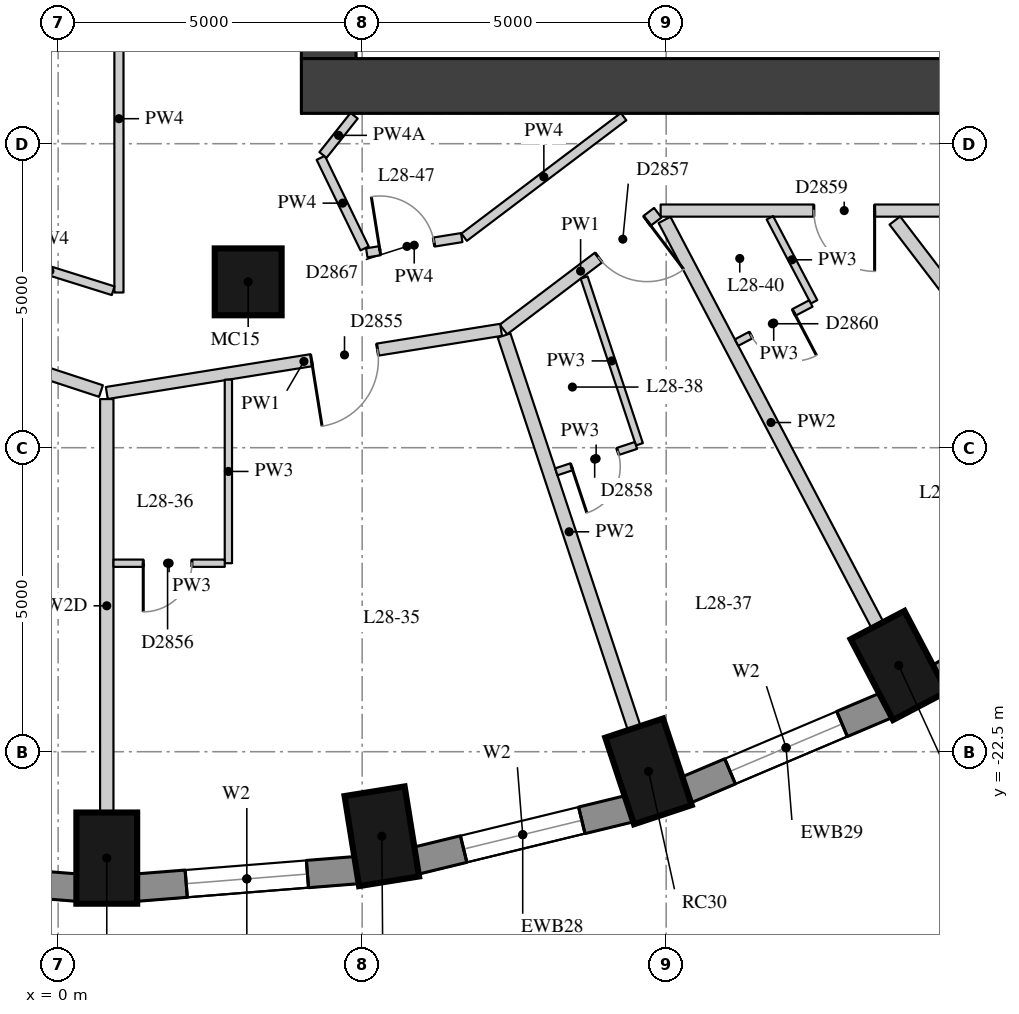
"""IFC4 building model, lengths in metres.
Left out: names, types, materials, properties, quantities, classifications, styles, units other than length and angle.
Written with IfcOpenShell. Run it as: python <this file> out.ifc"""

import sys

from ifc_helpers import new_model, si_unit, direction, frame, frame_2d, origin, origin_2d, place, context, subcontext, project, spatial, rectangle, extrude, element, fill, save


model = new_model("IFC4")
c1 = context("Model", 3, precision=1e-05, world=origin(), true_north=direction((0.0, 1.0)))
c2 = subcontext(c1, "Body", "Model", "MODEL_VIEW")
j1 = project(units=[si_unit("LENGTHUNIT", "METRE"), si_unit("PLANEANGLEUNIT", "RADIAN")], contexts=[c1])
p1 = place(None, origin())
s1 = spatial("IfcSite", under=j1, at=p1, CompositionType="ELEMENT")
p2 = place(p1, origin())
s2 = spatial("IfcBuilding", under=s1, at=p2, CompositionType="ELEMENT")
p3 = place(p2, frame((0.0, 0.0, 102.1)))
s3 = spatial("IfcBuildingStorey", under=s2, at=p3, CompositionType="ELEMENT", Elevation=102.1)
for number, where, z_axis, x_axis in (
    (1, (0.8, -24.25, 0.0), (0.0, 0.0, 1.0), (0.0, -1.0, 0.0)),
    (2, (5.323, -23.891, 0.0), (0.0, 0.0, 1.0), (0.159, -0.987, 0.0)),
    (3, (9.71, -22.824, 0.0), (0.0, 0.0, 1.0), (0.315, -0.949, 0.0)),
    (4, (13.825, -21.082, 0.0), (0.0, 0.0, 1.0), (0.465, -0.885, 0.0)),
):
    element("IfcColumn", number, at=place(p3, frame(where, z_axis=z_axis, x_axis=x_axis)), inside=s3, PredefinedType="COLUMN", context=c2, shape_type="SweptSolid", body=[
        extrude(rectangle(XDim=1.5, YDim=1.0, at=origin_2d()), origin(), (0.0, 0.0, 1.0), 3.3),
    ])
p4 = place(p3, frame((3.126, -14.772, 0.0), z_axis=(0.0, 0.0, 1.0), x_axis=(1.0, 0.0, 0.0)))
e5 = element("IfcColumn", 5, at=p4, inside=s3, PredefinedType="COLUMN", context=c2, shape_type="SweptSolid", body=[
    extrude(rectangle(XDim=1.1, YDim=1.1, at=origin_2d()), origin(), (0.0, 0.0, 1.0), 3.3),
])
p5 = place(p3, frame((-3.327, -24.447, 0.0), z_axis=(0.0, 0.0, 1.0), x_axis=(0.996862216754, -0.079156306178, 0.0)))
e6 = element("IfcWall", 6, at=p5, inside=s3, PredefinedType="SOLIDWALL", context=c2, shape_type="SweptSolid", body=[
    extrude(rectangle(XDim=3.658, YDim=0.45, at=frame_2d((1.829, 0.0))), origin(), (0.0, 0.0, 1.0), 3.02),
])
p6 = place(p5, frame((0.829, 0.0, 0.4)))
e7 = element("IfcOpeningElement", 7, at=p6, cuts=e6, PredefinedType="OPENING", context=c2, shape_type="SweptSolid", body=[
    extrude(rectangle(XDim=2.0, YDim=1.75, at=frame_2d((1.0, 0.875))), frame((0.0, 0.235, 0.0), z_axis=(0.0, -1.0, 0.0), x_axis=(1.0, 0.0, 0.0)), (0.0, 0.0, 1.0), 0.47),
])
p7 = place(p3, frame((1.28, -24.736, 0.0), z_axis=(0.0, 0.0, 1.0), x_axis=(0.996862216754, 0.079156306178, 0.0)))
e8 = element("IfcWall", 8, at=p7, inside=s3, PredefinedType="SOLIDWALL", context=c2, shape_type="SweptSolid", body=[
    extrude(rectangle(XDim=3.658, YDim=0.45, at=frame_2d((1.829, 0.0))), origin(), (0.0, 0.0, 1.0), 3.02),
])
p8 = place(p7, frame((0.829, 0.0, 0.4)))
e9 = element("IfcOpeningElement", 9, at=p8, cuts=e8, PredefinedType="OPENING", context=c2, shape_type="SweptSolid", body=[
    extrude(rectangle(XDim=2.0, YDim=1.75, at=frame_2d((1.0, 0.875))), frame((0.0, 0.235, 0.0), z_axis=(0.0, -1.0, 0.0), x_axis=(1.0, 0.0, 0.0)), (0.0, 0.0, 1.0), 0.47),
])
p9 = place(p3, frame((5.875, -24.294, 0.0), z_axis=(0.0, 0.0, 1.0), x_axis=(0.971667603162, 0.236351579148, 0.0)))
e10 = element("IfcWall", 10, at=p9, inside=s3, PredefinedType="SOLIDWALL", context=c2, shape_type="SweptSolid", body=[
    extrude(rectangle(XDim=3.635, YDim=0.45, at=frame_2d((1.817, 0.0))), origin(), (0.0, 0.0, 1.0), 3.02),
])
p10 = place(p9, frame((0.817, 0.0, 0.4)))
e11 = element("IfcOpeningElement", 11, at=p10, cuts=e10, PredefinedType="OPENING", context=c2, shape_type="SweptSolid", body=[
    extrude(rectangle(XDim=2.0, YDim=1.75, at=frame_2d((1.0, 0.875))), frame((0.0, 0.235, 0.0), z_axis=(0.0, -1.0, 0.0), x_axis=(1.0, 0.0, 0.0)), (0.0, 0.0, 1.0), 0.47),
])
p11 = place(p3, frame((10.318, -23.134, 0.0), z_axis=(0.0, 0.0, 1.0), x_axis=(0.920869643542, 0.389870619055, 0.0)))
e12 = element("IfcWall", 12, at=p11, inside=s3, PredefinedType="SOLIDWALL", context=c2, shape_type="SweptSolid", body=[
    extrude(rectangle(XDim=3.591, YDim=0.45, at=frame_2d((1.796, 0.0))), origin(), (0.0, 0.0, 1.0), 3.02),
])
p12 = place(p11, frame((0.796, 0.0, 0.4)))
e13 = element("IfcOpeningElement", 13, at=p12, cuts=e12, PredefinedType="OPENING", context=c2, shape_type="SweptSolid", body=[
    extrude(rectangle(XDim=2.0, YDim=1.75, at=frame_2d((1.0, 0.875))), frame((0.0, 0.235, 0.0), z_axis=(0.0, -1.0, 0.0), x_axis=(1.0, 0.0, 0.0)), (0.0, 0.0, 1.0), 0.47),
])
p13 = place(p3, frame((14.475, -21.287, 0.0), z_axis=(0.0, 0.0, 1.0), x_axis=(0.843911841423, 0.536481876587, 0.0)))
e14 = element("IfcWall", 14, at=p13, inside=s3, PredefinedType="SOLIDWALL", context=c2, shape_type="SweptSolid", body=[
    extrude(rectangle(XDim=3.532, YDim=0.45, at=frame_2d((1.766, 0.0))), origin(), (0.0, 0.0, 1.0), 3.02),
])
p14 = place(p13, frame((0.766, 0.0, 0.4)))
e15 = element("IfcOpeningElement", 15, at=p14, cuts=e14, PredefinedType="OPENING", context=c2, shape_type="SweptSolid", body=[
    extrude(rectangle(XDim=2.0, YDim=1.75, at=frame_2d((1.0, 0.875))), frame((0.0, 0.235, 0.0), z_axis=(0.0, -1.0, 0.0), x_axis=(1.0, 0.0, 0.0)), (0.0, 0.0, 1.0), 0.47),
])
p15 = place(p3, frame((4.45, -11.1, 0.0), z_axis=(0.0, 0.0, 1.0), x_axis=(0.0, 1.0, 0.0)))
e16 = element("IfcWall", 16, at=p15, inside=s3, PredefinedType="SHEAR", context=c2, shape_type="SweptSolid", body=[
    extrude(rectangle(XDim=22.2, YDim=0.9, at=frame_2d((11.1, 0.0))), origin(), (0.0, 0.0, 1.0), 3.02),
])
p16 = place(p15, frame((2.35, 0.0, 0.0)))
e17 = element("IfcOpeningElement", 17, at=p16, cuts=e16, PredefinedType="OPENING", context=c2, shape_type="SweptSolid", body=[
    extrude(rectangle(XDim=1.5, YDim=2.1, at=frame_2d((0.75, 1.05))), frame((0.0, 0.46, 0.0), z_axis=(0.0, -1.0, 0.0), x_axis=(1.0, 0.0, 0.0)), (0.0, 0.0, 1.0), 0.92),
])
p17 = place(p15, frame((5.45, 0.0, 0.0)))
e18 = element("IfcOpeningElement", 18, at=p17, cuts=e16, PredefinedType="OPENING", context=c2, shape_type="SweptSolid", body=[
    extrude(rectangle(XDim=1.8, YDim=2.1, at=frame_2d((0.9, 1.05))), frame((0.0, 0.46, 0.0), z_axis=(0.0, -1.0, 0.0), x_axis=(1.0, 0.0, 0.0)), (0.0, 0.0, 1.0), 0.92),
])
p18 = place(p15, frame((7.95, 0.0, 0.0)))
e19 = element("IfcOpeningElement", 19, at=p18, cuts=e16, PredefinedType="OPENING", context=c2, shape_type="SweptSolid", body=[
    extrude(rectangle(XDim=1.1, YDim=2.1, at=frame_2d((0.55, 1.05))), frame((0.0, 0.46, 0.0), z_axis=(0.0, -1.0, 0.0), x_axis=(1.0, 0.0, 0.0)), (0.0, 0.0, 1.0), 0.92),
])
p19 = place(p15, frame((10.6, 0.0, 0.0)))
e20 = element("IfcOpeningElement", 20, at=p19, cuts=e16, PredefinedType="OPENING", context=c2, shape_type="SweptSolid", body=[
    extrude(rectangle(XDim=1.0, YDim=2.1, at=frame_2d((0.5, 1.05))), frame((0.0, 0.46, 0.0), z_axis=(0.0, -1.0, 0.0), x_axis=(1.0, 0.0, 0.0)), (0.0, 0.0, 1.0), 0.92),
])
p20 = place(p15, frame((13.15, 0.0, 0.0)))
e21 = element("IfcOpeningElement", 21, at=p20, cuts=e16, PredefinedType="OPENING", context=c2, shape_type="SweptSolid", body=[
    extrude(rectangle(XDim=1.1, YDim=2.1, at=frame_2d((0.55, 1.05))), frame((0.0, 0.46, 0.0), z_axis=(0.0, -1.0, 0.0), x_axis=(1.0, 0.0, 0.0)), (0.0, 0.0, 1.0), 0.92),
])
p21 = place(p15, frame((14.95, 0.0, 0.0)))
e22 = element("IfcOpeningElement", 22, at=p21, cuts=e16, PredefinedType="OPENING", context=c2, shape_type="SweptSolid", body=[
    extrude(rectangle(XDim=1.8, YDim=2.1, at=frame_2d((0.9, 1.05))), frame((0.0, 0.46, 0.0), z_axis=(0.0, -1.0, 0.0), x_axis=(1.0, 0.0, 0.0)), (0.0, 0.0, 1.0), 0.92),
])
p22 = place(p15, frame((18.35, 0.0, 0.0)))
e23 = element("IfcOpeningElement", 23, at=p22, cuts=e16, PredefinedType="OPENING", context=c2, shape_type="SweptSolid", body=[
    extrude(rectangle(XDim=1.5, YDim=2.1, at=frame_2d((0.75, 1.05))), frame((0.0, 0.46, 0.0), z_axis=(0.0, -1.0, 0.0), x_axis=(1.0, 0.0, 0.0)), (0.0, 0.0, 1.0), 0.92),
])
p23 = place(p3, frame((4.0, -11.55, 0.0), z_axis=(0.0, 0.0, 1.0), x_axis=(1.0, 0.0, 0.0)))
e24 = element("IfcWall", 24, at=p23, inside=s3, PredefinedType="SHEAR", context=c2, shape_type="SweptSolid", body=[
    extrude(rectangle(XDim=15.2, YDim=0.9, at=frame_2d((7.6, 0.0))), origin(), (0.0, 0.0, 1.0), 3.02),
])
p24 = place(p3, frame((20.7, -13.6, 0.0), z_axis=(0.0, 0.0, 1.0), x_axis=(-1.0, 0.0, 0.0)))
e25 = element("IfcWall", 25, at=p24, inside=s3, PredefinedType="PARTITIONING", context=c2, shape_type="SweptSolid", body=[
    extrude(rectangle(XDim=10.791, YDim=0.2, at=frame_2d((5.396, 0.0))), origin(), (0.0, 0.0, 1.0), 3.02),
])
p25 = place(p24, frame((7.272, 0.0, 0.0)))
e26 = element("IfcOpeningElement", 26, at=p25, cuts=e25, PredefinedType="OPENING", context=c2, shape_type="SweptSolid", body=[
    extrude(rectangle(XDim=1.0, YDim=2.1, at=frame_2d((0.5, 1.05))), frame((0.0, 0.11, 0.0), z_axis=(0.0, -1.0, 0.0), x_axis=(1.0, 0.0, 0.0)), (0.0, 0.0, 1.0), 0.22),
])
p26 = place(p24, frame((2.638, 0.0, 0.0)))
e27 = element("IfcOpeningElement", 27, at=p26, cuts=e25, PredefinedType="OPENING", context=c2, shape_type="SweptSolid", body=[
    extrude(rectangle(XDim=1.8, YDim=2.1, at=frame_2d((0.9, 1.05))), frame((0.0, 0.11, 0.0), z_axis=(0.0, -1.0, 0.0), x_axis=(1.0, 0.0, 0.0)), (0.0, 0.0, 1.0), 0.22),
])
p27 = place(p3, frame((9.861, -13.636, 0.0), z_axis=(0.0, 0.0, 1.0), x_axis=(-0.797589990076, -0.603199973251, 0.0)))
e28 = element("IfcWall", 28, at=p27, inside=s3, PredefinedType="PARTITIONING", context=c2, shape_type="SweptSolid", body=[
    extrude(rectangle(XDim=3.181, YDim=0.2, at=frame_2d((1.591, 0.0))), origin(), (0.0, 0.0, 1.0), 3.02),
])
p28 = place(p27, frame((0.22, 0.0, 0.0)))
e29 = element("IfcOpeningElement", 29, at=p28, cuts=e28, PredefinedType="OPENING", context=c2, shape_type="SweptSolid", body=[
    extrude(rectangle(XDim=1.0, YDim=2.1, at=frame_2d((0.5, 1.05))), frame((0.0, 0.11, 0.0), z_axis=(0.0, -1.0, 0.0), x_axis=(1.0, 0.0, 0.0)), (0.0, 0.0, 1.0), 0.22),
])
p29 = place(p3, frame((7.284, -15.561, 0.0), z_axis=(0.0, 0.0, 1.0), x_axis=(-0.987409293733, -0.158186240393, 0.0)))
e30 = element("IfcWall", 30, at=p29, inside=s3, PredefinedType="PARTITIONING", context=c2, shape_type="SweptSolid", body=[
    extrude(rectangle(XDim=6.567, YDim=0.2, at=frame_2d((3.284, 0.0))), origin(), (0.0, 0.0, 1.0), 3.02),
])
p30 = place(p29, frame((2.057, 0.0, 0.0)))
e31 = element("IfcOpeningElement", 31, at=p30, cuts=e30, PredefinedType="OPENING", context=c2, shape_type="SweptSolid", body=[
    extrude(rectangle(XDim=1.1, YDim=2.1, at=frame_2d((0.55, 1.05))), frame((0.0, 0.11, 0.0), z_axis=(0.0, -1.0, 0.0), x_axis=(1.0, 0.0, 0.0)), (0.0, 0.0, 1.0), 0.22),
])
p31 = place(p3, frame((0.705, -16.568, 0.0), z_axis=(0.0, 0.0, 1.0), x_axis=(-0.950067715644, 0.312043804122, 0.0)))
e32 = element("IfcWall", 32, at=p31, inside=s3, PredefinedType="PARTITIONING", context=c2, shape_type="SweptSolid", body=[
    extrude(rectangle(XDim=9.057, YDim=0.2, at=frame_2d((4.528, 0.0))), origin(), (0.0, 0.0, 1.0), 2.57),
])
p32 = place(p31, frame((2.045, 0.0, 0.0)))
e33 = element("IfcOpeningElement", 33, at=p32, cuts=e32, PredefinedType="OPENING", context=c2, shape_type="SweptSolid", body=[
    extrude(rectangle(XDim=1.1, YDim=2.1, at=frame_2d((0.55, 1.05))), frame((0.0, 0.11, 0.0), z_axis=(0.0, -1.0, 0.0), x_axis=(1.0, 0.0, 0.0)), (0.0, 0.0, 1.0), 0.22),
])
p33 = place(p3, frame((1.0, -9.23, 0.0), z_axis=(0.0, 0.0, 1.0), x_axis=(0.0, -1.0, 0.0)))
e34 = element("IfcWall", 34, at=p33, inside=s3, PredefinedType="PARTITIONING", context=c2, shape_type="SweptSolid", body=[
    extrude(rectangle(XDim=5.718, YDim=0.15, at=frame_2d((2.859, 0.0))), origin(), (0.0, 0.0, 1.0), 3.02),
])
p34 = place(p3, frame((0.905, -14.918, 0.0), z_axis=(0.0, 0.0, 1.0), x_axis=(-0.954324426349, 0.298772303391, 0.0)))
e35 = element("IfcWall", 35, at=p34, inside=s3, PredefinedType="PARTITIONING", context=c2, shape_type="SweptSolid", body=[
    extrude(rectangle(XDim=2.18, YDim=0.15, at=frame_2d((1.09, 0.0))), origin(), (0.0, 0.0, 1.0), 3.02),
])
p35 = place(p3, frame((9.3, -12.055, 0.0), z_axis=(0.0, 0.0, 1.0), x_axis=(-0.79762360872, -0.603155517933, 0.0)))
e36 = element("IfcWall", 36, at=p35, inside=s3, PredefinedType="PARTITIONING", context=c2, shape_type="SweptSolid", body=[
    extrude(rectangle(XDim=3.288, YDim=0.15, at=frame_2d((1.644, 0.0))), origin(), (0.0, 0.0, 1.0), 3.02),
])
p36 = place(p3, frame((6.637, -14.044, 0.0), z_axis=(0.0, 0.0, 1.0), x_axis=(-0.987404968029, -0.158213239367, 0.0)))
e37 = element("IfcWall", 37, at=p36, inside=s3, PredefinedType="PARTITIONING", context=c2, shape_type="SweptSolid", body=[
    extrude(rectangle(XDim=1.582, YDim=0.15, at=frame_2d((0.791, 0.0))), origin(), (0.0, 0.0, 1.0), 3.02),
])
p37 = place(p36, frame((0.462, 0.0, 0.0)))
e38 = element("IfcOpeningElement", 38, at=p37, cuts=e37, PredefinedType="OPENING", context=c2, shape_type="SweptSolid", body=[
    extrude(rectangle(XDim=0.9, YDim=2.1, at=frame_2d((0.45, 1.05))), frame((0.0, 0.085, 0.0), z_axis=(0.0, -1.0, 0.0), x_axis=(1.0, 0.0, 0.0)), (0.0, 0.0, 1.0), 0.17),
])
p38 = place(p3, frame((5.041, -14.222, 0.0), z_axis=(0.0, 0.0, 1.0), x_axis=(-0.436031090703, 0.899931601812, 0.0)))
e39 = element("IfcWall", 39, at=p38, inside=s3, PredefinedType="PARTITIONING", context=c2, shape_type="SweptSolid", body=[
    extrude(rectangle(XDim=1.656, YDim=0.15, at=frame_2d((0.828, 0.0))), origin(), (0.0, 0.0, 1.0), 3.02),
])
p39 = place(p3, frame((4.356, -12.686, 0.0), z_axis=(0.0, 0.0, 1.0), x_axis=(0.621438600293, 0.783462868339, 0.0)))
e40 = element("IfcWall", 40, at=p39, inside=s3, PredefinedType="PARTITIONING", context=c2, shape_type="SweptSolid", body=[
    extrude(rectangle(XDim=0.824, YDim=0.15, at=frame_2d((0.412, 0.0))), origin(), (0.0, 0.0, 1.0), 2.57),
])
p40 = place(p3, frame((0.8, -23.5, 0.0), z_axis=(0.0, 0.0, 1.0), x_axis=(0.0, 1.0, 0.0)))
e41 = element("IfcWall", 41, at=p40, inside=s3, PredefinedType="PARTITIONING", context=c2, shape_type="SweptSolid", body=[
    extrude(rectangle(XDim=6.8, YDim=0.22, at=frame_2d((3.4, 0.0))), origin(), (0.0, 0.0, 1.0), 2.47),
])
p41 = place(p3, frame((9.474, -22.112, 0.0), z_axis=(0.0, 0.0, 1.0), x_axis=(-0.314536861663, 0.949245259485, 0.0)))
e42 = element("IfcWall", 42, at=p41, inside=s3, PredefinedType="PARTITIONING", context=c2, shape_type="SweptSolid", body=[
    extrude(rectangle(XDim=6.802, YDim=0.22, at=frame_2d((3.401, 0.0))), origin(), (0.0, 0.0, 1.0), 3.02),
])
p42 = place(p3, frame((13.476, -20.418, 0.0), z_axis=(0.0, 0.0, 1.0), x_axis=(-0.465332071749, 0.885136183308, 0.0)))
e43 = element("IfcWall", 43, at=p42, inside=s3, PredefinedType="PARTITIONING", context=c2, shape_type="SweptSolid", body=[
    extrude(rectangle(XDim=7.529, YDim=0.22, at=frame_2d((3.764, 0.0))), origin(), (0.0, 0.0, 1.0), 3.02),
])
p43 = place(p3, frame((17.089, -18.121, 0.0), z_axis=(0.0, 0.0, 1.0), x_axis=(-0.607064955951, 0.794652212767, 0.0)))
e44 = element("IfcWall", 44, at=p43, inside=s3, PredefinedType="PARTITIONING", context=c2, shape_type="SweptSolid", body=[
    extrude(rectangle(XDim=5.483, YDim=0.22, at=frame_2d((2.742, 0.0))), origin(), (0.0, 0.0, 1.0), 3.02),
])
p44 = place(p3, frame((2.8, -16.381, 0.0), z_axis=(0.0, 0.0, 1.0), x_axis=(0.0, -1.0, 0.0)))
e45 = element("IfcWall", 45, at=p44, inside=s3, PredefinedType="PARTITIONING", context=c2, shape_type="SweptSolid", body=[
    extrude(rectangle(XDim=3.019, YDim=0.12, at=frame_2d((1.51, 0.0))), origin(), (0.0, 0.0, 1.0), 3.02),
])
p45 = place(p3, frame((8.651, -14.701, 0.0), z_axis=(0.0, 0.0, 1.0), x_axis=(0.314630509088, -0.949214223846, 0.0)))
e46 = element("IfcWall", 46, at=p45, inside=s3, PredefinedType="PARTITIONING", context=c2, shape_type="SweptSolid", body=[
    extrude(rectangle(XDim=2.89, YDim=0.12, at=frame_2d((1.445, 0.0))), origin(), (0.0, 0.0, 1.0), 3.02),
])
p46 = place(p3, frame((11.705, -13.718, 0.0), z_axis=(0.0, 0.0, 1.0), x_axis=(0.465437210927, -0.885080901773, 0.0)))
e47 = element("IfcWall", 47, at=p46, inside=s3, PredefinedType="PARTITIONING", context=c2, shape_type="SweptSolid", body=[
    extrude(rectangle(XDim=1.562, YDim=0.12, at=frame_2d((0.781, 0.0))), origin(), (0.0, 0.0, 1.0), 3.02),
])
p47 = place(p3, frame((2.74, -19.4, 0.0), z_axis=(0.0, 0.0, 1.0), x_axis=(-1.0, 0.0, 0.0)))
e48 = element("IfcWall", 48, at=p47, inside=s3, PredefinedType="PARTITIONING", context=c2, shape_type="SweptSolid", body=[
    extrude(rectangle(XDim=1.83, YDim=0.12, at=frame_2d((0.915, 0.0))), origin(), (0.0, 0.0, 1.0), 3.02),
])
p48 = place(p47, frame((0.54, 0.0, 0.0)))
e49 = element("IfcOpeningElement", 49, at=p48, cuts=e48, PredefinedType="OPENING", context=c2, shape_type="SweptSolid", body=[
    extrude(rectangle(XDim=0.8, YDim=2.1, at=frame_2d((0.4, 1.05))), frame((0.0, 0.07, 0.0), z_axis=(0.0, -1.0, 0.0), x_axis=(1.0, 0.0, 0.0)), (0.0, 0.0, 1.0), 0.14),
])
p49 = place(p3, frame((9.503, -17.463, 0.0), z_axis=(0.0, 0.0, 1.0), x_axis=(-0.949247859497, -0.314529014943, 0.0)))
e50 = element("IfcWall", 50, at=p49, inside=s3, PredefinedType="PARTITIONING", context=c2, shape_type="SweptSolid", body=[
    extrude(rectangle(XDim=1.38, YDim=0.12, at=frame_2d((0.69, 0.0))), origin(), (0.0, 0.0, 1.0), 3.02),
])
p50 = place(p49, frame((0.315, 0.0, 0.0)))
e51 = element("IfcOpeningElement", 51, at=p50, cuts=e50, PredefinedType="OPENING", context=c2, shape_type="SweptSolid", body=[
    extrude(rectangle(XDim=0.8, YDim=2.1, at=frame_2d((0.4, 1.05))), frame((0.0, 0.07, 0.0), z_axis=(0.0, -1.0, 0.0), x_axis=(1.0, 0.0, 0.0)), (0.0, 0.0, 1.0), 0.14),
])
p51 = place(p3, frame((12.379, -15.128, 0.0), z_axis=(0.0, 0.0, 1.0), x_axis=(-0.885113826366, -0.465374595757, 0.0)))
e52 = element("IfcWall", 52, at=p51, inside=s3, PredefinedType="PARTITIONING", context=c2, shape_type="SweptSolid", body=[
    extrude(rectangle(XDim=1.38, YDim=0.12, at=frame_2d((0.69, 0.0))), origin(), (0.0, 0.0, 1.0), 3.02),
])
p52 = place(p51, frame((0.315, 0.0, 0.0)))
e53 = element("IfcOpeningElement", 53, at=p52, cuts=e52, PredefinedType="OPENING", context=c2, shape_type="SweptSolid", body=[
    extrude(rectangle(XDim=0.8, YDim=2.1, at=frame_2d((0.4, 1.05))), frame((0.0, 0.07, 0.0), z_axis=(0.0, -1.0, 0.0), x_axis=(1.0, 0.0, 0.0)), (0.0, 0.0, 1.0), 0.14),
])
p53 = place(p8, origin())
e54 = element("IfcWindow", 54, at=p53, inside=s3, PartitioningType="SINGLE_PANEL", PredefinedType="WINDOW", context=c2, shape_type="SweptSolid", body=[
    extrude(rectangle(XDim=2.0, YDim=1.75, at=frame_2d((1.0, 0.875))), frame((0.0, 0.035, 0.0), z_axis=(0.0, -1.0, 0.0), x_axis=(1.0, 0.0, 0.0)), (0.0, 0.0, 1.0), 0.06),
])
fill(e9, e54)
p54 = place(p10, origin())
e55 = element("IfcWindow", 55, at=p54, inside=s3, PartitioningType="SINGLE_PANEL", PredefinedType="WINDOW", context=c2, shape_type="SweptSolid", body=[
    extrude(rectangle(XDim=2.0, YDim=1.75, at=frame_2d((1.0, 0.875))), frame((0.0, 0.035, 0.0), z_axis=(0.0, -1.0, 0.0), x_axis=(1.0, 0.0, 0.0)), (0.0, 0.0, 1.0), 0.06),
])
fill(e11, e55)
p55 = place(p12, origin())
e56 = element("IfcWindow", 56, at=p55, inside=s3, PartitioningType="SINGLE_PANEL", PredefinedType="WINDOW", context=c2, shape_type="SweptSolid", body=[
    extrude(rectangle(XDim=2.0, YDim=1.75, at=frame_2d((1.0, 0.875))), frame((0.0, 0.035, 0.0), z_axis=(0.0, -1.0, 0.0), x_axis=(1.0, 0.0, 0.0)), (0.0, 0.0, 1.0), 0.06),
])
fill(e13, e56)
p56 = place(p30, origin())
e57 = element("IfcDoor", 57, at=p56, inside=s3, OperationType="SINGLE_SWING_RIGHT", PredefinedType="DOOR", context=c2, shape_type="SweptSolid", body=[
    extrude(rectangle(XDim=1.1, YDim=2.1, at=frame_2d((0.55, 1.05))), frame((0.0, 0.025, 0.0), z_axis=(0.0, -1.0, 0.0), x_axis=(1.0, 0.0, 0.0)), (0.0, 0.0, 1.0), 0.05),
])
fill(e31, e57)
p57 = place(p48, origin())
e58 = element("IfcDoor", 58, at=p57, inside=s3, OperationType="SINGLE_SWING_RIGHT", PredefinedType="DOOR", context=c2, shape_type="SweptSolid", body=[
    extrude(rectangle(XDim=0.8, YDim=2.1, at=frame_2d((0.4, 1.05))), frame((0.0, 0.025, 0.0), z_axis=(0.0, -1.0, 0.0), x_axis=(1.0, 0.0, 0.0)), (0.0, 0.0, 1.0), 0.05),
])
fill(e49, e58)
p58 = place(p28, origin())
e59 = element("IfcDoor", 59, at=p58, inside=s3, OperationType="SINGLE_SWING_LEFT", PredefinedType="DOOR", context=c2, shape_type="SweptSolid", body=[
    extrude(rectangle(XDim=1.0, YDim=2.1, at=frame_2d((0.5, 1.05))), frame((0.0, 0.025, 0.0), z_axis=(0.0, -1.0, 0.0), x_axis=(1.0, 0.0, 0.0)), (0.0, 0.0, 1.0), 0.05),
])
fill(e29, e59)
p59 = place(p50, origin())
e60 = element("IfcDoor", 60, at=p59, inside=s3, OperationType="SINGLE_SWING_RIGHT", PredefinedType="DOOR", context=c2, shape_type="SweptSolid", body=[
    extrude(rectangle(XDim=0.8, YDim=2.1, at=frame_2d((0.4, 1.05))), frame((0.0, 0.025, 0.0), z_axis=(0.0, -1.0, 0.0), x_axis=(1.0, 0.0, 0.0)), (0.0, 0.0, 1.0), 0.05),
])
fill(e51, e60)
p60 = place(p25, origin())
e61 = element("IfcDoor", 61, at=p60, inside=s3, OperationType="SINGLE_SWING_LEFT", PredefinedType="DOOR", context=c2, shape_type="SweptSolid", body=[
    extrude(rectangle(XDim=1.0, YDim=2.1, at=frame_2d((0.5, 1.05))), frame((0.0, 0.025, 0.0), z_axis=(0.0, -1.0, 0.0), x_axis=(1.0, 0.0, 0.0)), (0.0, 0.0, 1.0), 0.05),
])
fill(e26, e61)
p61 = place(p52, origin())
e62 = element("IfcDoor", 62, at=p61, inside=s3, OperationType="SINGLE_SWING_LEFT", PredefinedType="DOOR", context=c2, shape_type="SweptSolid", body=[
    extrude(rectangle(XDim=0.8, YDim=2.1, at=frame_2d((0.4, 1.05))), frame((0.0, 0.025, 0.0), z_axis=(0.0, -1.0, 0.0), x_axis=(1.0, 0.0, 0.0)), (0.0, 0.0, 1.0), 0.05),
])
fill(e53, e62)
p62 = place(p37, origin())
e63 = element("IfcDoor", 63, at=p62, inside=s3, OperationType="SINGLE_SWING_LEFT", PredefinedType="DOOR", context=c2, shape_type="SweptSolid", body=[
    extrude(rectangle(XDim=0.9, YDim=2.1, at=frame_2d((0.45, 1.05))), frame((0.0, 0.025, 0.0), z_axis=(0.0, -1.0, 0.0), x_axis=(1.0, 0.0, 0.0)), (0.0, 0.0, 1.0), 0.05),
])
fill(e38, e63)
save(model, sys.argv[1])
